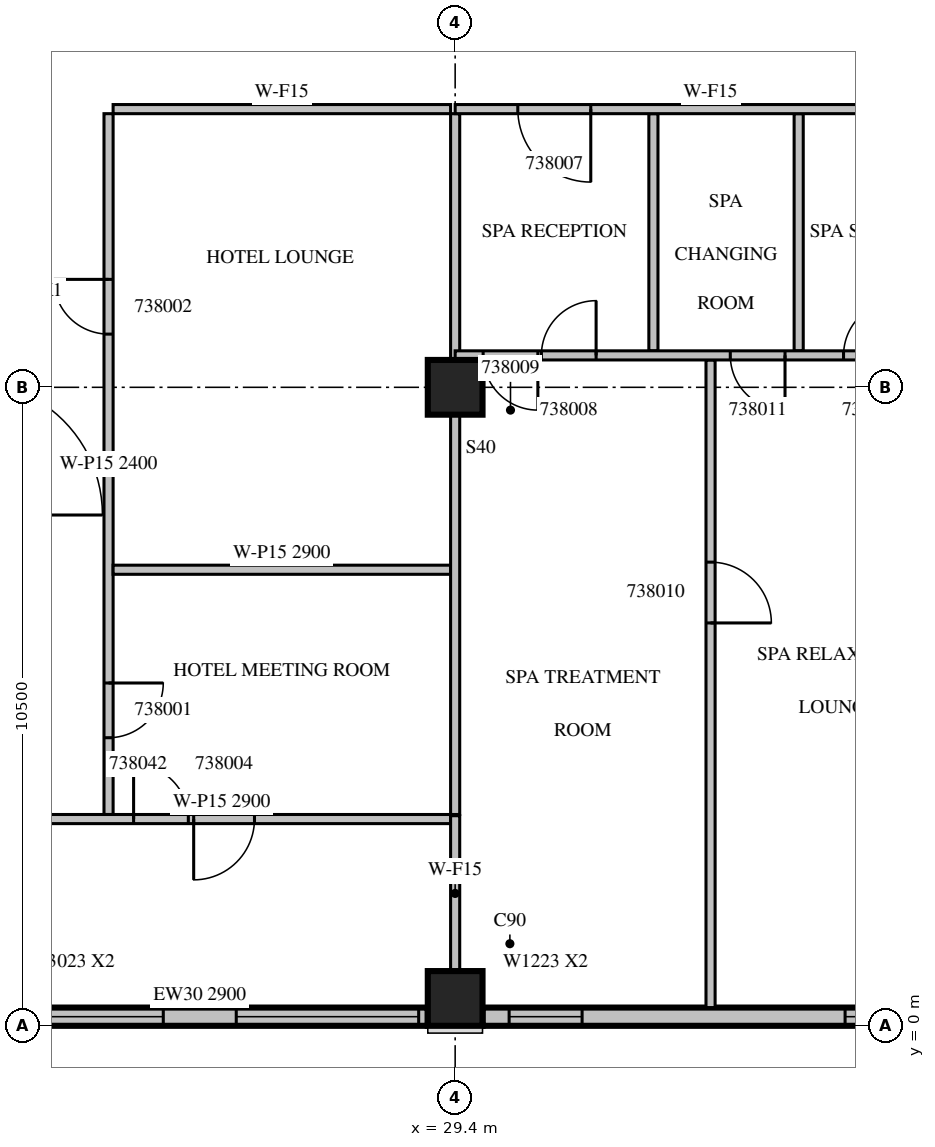
"""IFC4 building model, lengths in metres.
Left out: names, types, materials, properties, quantities, classifications, styles, units other than length and angle.
Written with IfcOpenShell. Run it as: python <this file> out.ifc"""

import sys

from ifc_helpers import new_model, si_unit, direction, frame, frame_2d, origin, origin_2d, place, context, subcontext, project, spatial, rectangle, extrude, source, transform, mapped, element, fill, save


model = new_model("IFC4")
c1 = context("Model", 3, precision=1e-05, world=origin(), true_north=direction((0.0, 1.0)))
c2 = subcontext(c1, "Body", "Model", "MODEL_VIEW")
j1 = project(units=[si_unit("LENGTHUNIT", "METRE"), si_unit("PLANEANGLEUNIT", "RADIAN")], contexts=[c1])
p1 = place(None, origin())
s1 = spatial("IfcSite", under=j1, at=p1, CompositionType="ELEMENT")
p2 = place(p1, origin())
s2 = spatial("IfcBuilding", under=s1, at=p2, CompositionType="ELEMENT")
p3 = place(p2, frame((0.0, 0.0, 177.8)))
s3 = spatial("IfcBuildingStorey", under=s2, at=p3, CompositionType="ELEMENT", Elevation=177.8)
m1 = source(origin(), c2, "Body", "SweptSolid", [
    extrude(rectangle(XDim=0.9, YDim=0.9, at=origin_2d()), origin(), (0.0, 0.0, 1.0), 3.8),
])
for number, where, z_axis, x_axis in (
    (1, (29.4, 0.45, 0.0), (0.0, 0.0, 1.0), (1.0, 0.0, 0.0)),
    (2, (29.4, 10.5, 0.0), (0.0, 0.0, 1.0), (1.0, 0.0, 0.0)),
):
    element("IfcColumn", number, at=place(p3, frame(where, z_axis=z_axis, x_axis=x_axis)), inside=s3, PredefinedType="COLUMN", context=c2, shape_type="MappedRepresentation", body=[
        mapped(m1, transform((0.0, 0.0, 0.0), scale=1.0)),
    ])
p4 = place(p3, frame((21.45, 0.15, 0.0), z_axis=(0.0, 0.0, 1.0), x_axis=(1.0, 0.0, 0.0)))
e3 = element("IfcWall", 3, at=p4, inside=s3, PredefinedType="STANDARD", context=c2, shape_type="SweptSolid", body=[
    extrude(rectangle(XDim=7.5, YDim=0.3, at=frame_2d((3.75, 0.0))), origin(), (0.0, 0.0, 1.0), 2.9),
])
p5 = place(p4, frame((0.15, 0.0, 0.6)))
e4 = element("IfcOpeningElement", 4, at=p5, cuts=e3, PredefinedType="OPENING", context=c2, shape_type="SweptSolid", body=[
    extrude(rectangle(XDim=3.0, YDim=2.3, at=frame_2d((1.5, 1.15))), frame((0.0, 0.16, 0.0), z_axis=(0.0, -1.0, 0.0), x_axis=(1.0, 0.0, 0.0)), (0.0, 0.0, 1.0), 0.32),
])
m2 = source(origin(), c2, "Body", "SweptSolid", [
    extrude(rectangle(XDim=3.0, YDim=2.3, at=frame_2d((1.5, 1.15))), frame((0.0, 0.16, 0.0), z_axis=(0.0, -1.0, 0.0), x_axis=(1.0, 0.0, 0.0)), (0.0, 0.0, 1.0), 0.32),
])
p6 = place(p4, frame((4.35, 0.0, 0.6)))
e5 = element("IfcOpeningElement", 5, at=p6, cuts=e3, PredefinedType="OPENING", context=c2, shape_type="MappedRepresentation", body=[
    mapped(m2, transform((0.0, 0.0, 0.0), scale=1.0)),
])
p7 = place(p3, frame((29.85, 0.15, 0.0), z_axis=(0.0, 0.0, 1.0), x_axis=(1.0, 0.0, 0.0)))
e6 = element("IfcWall", 6, at=p7, inside=s3, PredefinedType="STANDARD", context=c2, shape_type="SweptSolid", body=[
    extrude(rectangle(XDim=7.5, YDim=0.3, at=frame_2d((3.75, 0.0))), origin(), (0.0, 0.0, 1.0), 3.4),
])
p8 = place(p7, frame((0.438, 0.0, 0.6)))
e7 = element("IfcOpeningElement", 7, at=p8, cuts=e6, PredefinedType="OPENING", context=c2, shape_type="SweptSolid", body=[
    extrude(rectangle(XDim=1.2, YDim=2.3, at=frame_2d((0.6, 1.15))), frame((0.0, 0.16, 0.0), z_axis=(0.0, -1.0, 0.0), x_axis=(1.0, 0.0, 0.0)), (0.0, 0.0, 1.0), 0.32),
])
m3 = source(origin(), c2, "Body", "SweptSolid", [
    extrude(rectangle(XDim=1.2, YDim=2.3, at=frame_2d((0.6, 1.15))), frame((0.0, 0.16, 0.0), z_axis=(0.0, -1.0, 0.0), x_axis=(1.0, 0.0, 0.0)), (0.0, 0.0, 1.0), 0.32),
])
p9 = place(p7, frame((5.963, 0.0, 0.6)))
e8 = element("IfcOpeningElement", 8, at=p9, cuts=e6, PredefinedType="OPENING", context=c2, shape_type="MappedRepresentation", body=[
    mapped(m3, transform((0.0, 0.0, 0.0), scale=1.0)),
])
p10 = place(p3, frame((23.7, 15.0, 0.0), z_axis=(0.0, 0.0, 1.0), x_axis=(0.0, -1.0, 0.0)))
e9 = element("IfcWall", 9, at=p10, inside=s3, PredefinedType="PARTITIONING", context=c2, shape_type="SweptSolid", body=[
    extrude(rectangle(XDim=11.525, YDim=0.15, at=frame_2d((5.763, 0.0))), origin(), (0.0, 0.0, 1.0), 2.4),
])
m4 = source(origin(), c2, "Body", "SweptSolid", [
    extrude(rectangle(XDim=0.9, YDim=2.1, at=frame_2d((0.45, 1.05))), frame((0.0, 0.085, 0.0), z_axis=(0.0, -1.0, 0.0), x_axis=(1.0, 0.0, 0.0)), (0.0, 0.0, 1.0), 0.17),
])
p11 = place(p10, frame((9.363, 0.0, 0.0)))
e10 = element("IfcOpeningElement", 10, at=p11, cuts=e9, PredefinedType="OPENING", context=c2, shape_type="MappedRepresentation", body=[
    mapped(m4, transform((0.0, 0.0, 0.0), scale=1.0)),
])
p12 = place(p10, frame((2.725, 0.0, 0.0)))
e11 = element("IfcOpeningElement", 11, at=p12, cuts=e9, PredefinedType="OPENING", context=c2, shape_type="MappedRepresentation", body=[
    mapped(m4, transform((0.0, 0.0, 0.0), scale=1.0)),
])
p13 = place(p3, frame((29.325, 7.5, 0.0), z_axis=(0.0, 0.0, 1.0), x_axis=(-1.0, 0.0, 0.0)))
e12 = element("IfcWall", 12, at=p13, inside=s3, PredefinedType="PARTITIONING", context=c2, shape_type="SweptSolid", body=[
    extrude(rectangle(XDim=5.55, YDim=0.15, at=frame_2d((2.775, 0.0))), origin(), (0.0, 0.0, 1.0), 2.9),
])
p14 = place(p3, frame((29.325, 15.075, 0.0), z_axis=(0.0, 0.0, 1.0), x_axis=(-1.0, 0.0, 0.0)))
e13 = element("IfcWall", 13, at=p14, inside=s3, PredefinedType="PARTITIONING", context=c2, shape_type="SweptSolid", body=[
    extrude(rectangle(XDim=5.55, YDim=0.15, at=frame_2d((2.775, 0.0))), origin(), (0.0, 0.0, 1.0), 3.4),
])
p15 = place(p3, frame((29.4, 3.475, 0.0), z_axis=(0.0, 0.0, 1.0), x_axis=(0.0, 1.0, 0.0)))
e14 = element("IfcWall", 14, at=p15, inside=s3, PredefinedType="PARTITIONING", context=c2, shape_type="SweptSolid", body=[
    extrude(rectangle(XDim=6.576, YDim=0.15, at=frame_2d((3.288, 0.0))), origin(), (0.0, 0.0, 1.0), 3.4),
])
p16 = place(p3, frame((29.4, 10.949, 0.0), z_axis=(0.0, 0.0, 1.0), x_axis=(0.0, 1.0, 0.0)))
e15 = element("IfcWall", 15, at=p16, inside=s3, PredefinedType="PARTITIONING", context=c2, shape_type="SweptSolid", body=[
    extrude(rectangle(XDim=4.051, YDim=0.15, at=frame_2d((2.026, 0.0))), origin(), (0.0, 0.0, 1.0), 3.4),
])
p17 = place(p3, frame((21.8, 3.4, 0.0), z_axis=(0.0, 0.0, 1.0), x_axis=(1.0, 0.0, 0.0)))
e16 = element("IfcWall", 16, at=p17, inside=s3, PredefinedType="PARTITIONING", context=c2, shape_type="SweptSolid", body=[
    extrude(rectangle(XDim=7.525, YDim=0.15, at=frame_2d((3.763, 0.0))), origin(), (0.0, 0.0, 1.0), 2.9),
])
m5 = source(origin(), c2, "Body", "SweptSolid", [
    extrude(rectangle(XDim=1.0, YDim=2.1, at=frame_2d((0.5, 1.05))), frame((0.0, 0.085, 0.0), z_axis=(0.0, -1.0, 0.0), x_axis=(1.0, 0.0, 0.0)), (0.0, 0.0, 1.0), 0.17),
])
p18 = place(p17, frame((3.3, 0.0, 0.0)))
e17 = element("IfcOpeningElement", 17, at=p18, cuts=e16, PredefinedType="OPENING", context=c2, shape_type="MappedRepresentation", body=[
    mapped(m5, transform((0.0, 0.0, 0.0), scale=1.0)),
])
p19 = place(p17, frame((2.312, 0.0, 0.0)))
e18 = element("IfcOpeningElement", 18, at=p19, cuts=e16, PredefinedType="OPENING", context=c2, shape_type="MappedRepresentation", body=[
    mapped(m4, transform((0.0, 0.0, 0.0), scale=1.0)),
])
p20 = place(p3, frame((33.6, 0.3, 0.0), z_axis=(0.0, 0.0, 1.0), x_axis=(0.0, 1.0, 0.0)))
e19 = element("IfcWall", 19, at=p20, inside=s3, PredefinedType="PARTITIONING", context=c2, shape_type="SweptSolid", body=[
    extrude(rectangle(XDim=10.65, YDim=0.15, at=frame_2d((5.325, 0.0))), origin(), (0.0, 0.0, 1.0), 3.4),
])
p21 = place(p20, frame((6.325, 0.0, 0.0)))
e20 = element("IfcOpeningElement", 20, at=p21, cuts=e19, PredefinedType="OPENING", context=c2, shape_type="MappedRepresentation", body=[
    mapped(m5, transform((0.0, 0.0, 0.0), scale=1.0)),
])
p22 = place(p3, frame((32.66, 11.1, 0.0), z_axis=(0.0, 0.0, 1.0), x_axis=(0.0, 1.0, 0.0)))
e21 = element("IfcWall", 21, at=p22, inside=s3, PredefinedType="PARTITIONING", context=c2, shape_type="SweptSolid", body=[
    extrude(rectangle(XDim=3.9, YDim=0.15, at=frame_2d((1.95, 0.0))), origin(), (0.0, 0.0, 1.0), 3.4),
])
m6 = source(origin(), c2, "Body", "SweptSolid", [
    extrude(rectangle(XDim=3.9, YDim=0.15, at=frame_2d((1.95, 0.0))), origin(), (0.0, 0.0, 1.0), 3.4),
])
p23 = place(p3, frame((35.049, 11.1, 0.0), z_axis=(0.0, 0.0, 1.0), x_axis=(0.0, 1.0, 0.0)))
e22 = element("IfcWall", 22, at=p23, inside=s3, PredefinedType="PARTITIONING", context=c2, shape_type="MappedRepresentation", body=[
    mapped(m6, transform((0.0, 0.0, 0.0), scale=1.0)),
])
p24 = place(p3, frame((29.4, 0.899, 0.0), z_axis=(0.0, 0.0, 1.0), x_axis=(0.0, 1.0, 0.0)))
e23 = element("IfcWall", 23, at=p24, inside=s3, PredefinedType="PARTITIONING", context=c2, shape_type="SweptSolid", body=[
    extrude(rectangle(XDim=2.556, YDim=0.15, at=frame_2d((1.278, 0.0))), origin(), (0.0, 0.0, 1.0), 3.4),
])
p25 = place(p3, frame((37.8, 11.025, 0.0), z_axis=(0.0, 0.0, 1.0), x_axis=(-1.0, 0.0, 0.0)))
e24 = element("IfcWall", 24, at=p25, inside=s3, PredefinedType="PARTITIONING", context=c2, shape_type="SweptSolid", body=[
    extrude(rectangle(XDim=8.4, YDim=0.15, at=frame_2d((4.2, 0.0))), origin(), (0.0, 0.0, 1.0), 3.4),
])
p26 = place(p25, frame((6.082, 0.0, 0.0)))
e25 = element("IfcOpeningElement", 25, at=p26, cuts=e24, PredefinedType="OPENING", context=c2, shape_type="MappedRepresentation", body=[
    mapped(m4, transform((0.0, 0.0, 0.0), scale=1.0)),
])
p27 = place(p25, frame((7.04, 0.0, 0.0)))
e26 = element("IfcOpeningElement", 26, at=p27, cuts=e24, PredefinedType="OPENING", context=c2, shape_type="MappedRepresentation", body=[
    mapped(m4, transform((0.0, 0.0, 0.0), scale=1.0)),
])
p28 = place(p25, frame((2.975, 0.0, 0.0)))
e27 = element("IfcOpeningElement", 27, at=p28, cuts=e24, PredefinedType="OPENING", context=c2, shape_type="MappedRepresentation", body=[
    mapped(m4, transform((0.0, 0.0, 0.0), scale=1.0)),
])
p29 = place(p25, frame((1.113, 0.0, 0.0)))
e28 = element("IfcOpeningElement", 28, at=p29, cuts=e24, PredefinedType="OPENING", context=c2, shape_type="MappedRepresentation", body=[
    mapped(m4, transform((0.0, 0.0, 0.0), scale=1.0)),
])
m7 = source(origin(), c2, "Body", "SweptSolid", [
    extrude(rectangle(XDim=8.4, YDim=0.15, at=frame_2d((4.2, 0.0))), origin(), (0.0, 0.0, 1.0), 3.4),
])
p30 = place(p3, frame((37.8, 15.075, 0.0), z_axis=(0.0, 0.0, 1.0), x_axis=(-1.0, 0.0, 0.0)))
e29 = element("IfcWall", 29, at=p30, inside=s3, PredefinedType="PARTITIONING", context=c2, shape_type="MappedRepresentation", body=[
    mapped(m7, transform((0.0, 0.0, 0.0), scale=1.0)),
])
m8 = source(origin(), c2, "Body", "SweptSolid", [
    extrude(rectangle(XDim=1.2, YDim=2.1, at=frame_2d((0.6, 1.05))), frame((0.0, 0.085, 0.0), z_axis=(0.0, -1.0, 0.0), x_axis=(1.0, 0.0, 0.0)), (0.0, 0.0, 1.0), 0.17),
])
p31 = place(p30, frame((6.17, 0.0, 0.0)))
e30 = element("IfcOpeningElement", 30, at=p31, cuts=e29, PredefinedType="OPENING", context=c2, shape_type="MappedRepresentation", body=[
    mapped(m8, transform((0.0, 0.0, 0.0), scale=1.0)),
])
p32 = place(p5, origin())
e31 = element("IfcWindow", 31, at=p32, inside=s3, PartitioningType="SINGLE_PANEL", PredefinedType="WINDOW", context=c2, shape_type="SweptSolid", body=[
    extrude(rectangle(XDim=3.0, YDim=2.3, at=frame_2d((1.5, 1.15))), frame((0.0, 0.03, 0.0), z_axis=(0.0, -1.0, 0.0), x_axis=(1.0, 0.0, 0.0)), (0.0, 0.0, 1.0), 0.06),
])
fill(e4, e31)
m9 = source(origin(), c2, "Body", "SweptSolid", [
    extrude(rectangle(XDim=3.0, YDim=2.3, at=frame_2d((1.5, 1.15))), frame((0.0, 0.03, 0.0), z_axis=(0.0, -1.0, 0.0), x_axis=(1.0, 0.0, 0.0)), (0.0, 0.0, 1.0), 0.06),
])
p33 = place(p6, origin())
e32 = element("IfcWindow", 32, at=p33, inside=s3, PartitioningType="SINGLE_PANEL", PredefinedType="WINDOW", context=c2, shape_type="MappedRepresentation", body=[
    mapped(m9, transform((0.0, 0.0, 0.0), scale=1.0)),
])
fill(e5, e32)
p34 = place(p8, origin())
e33 = element("IfcWindow", 33, at=p34, inside=s3, PartitioningType="SINGLE_PANEL", PredefinedType="WINDOW", context=c2, shape_type="SweptSolid", body=[
    extrude(rectangle(XDim=1.2, YDim=2.3, at=frame_2d((0.6, 1.15))), frame((0.0, 0.03, 0.0), z_axis=(0.0, -1.0, 0.0), x_axis=(1.0, 0.0, 0.0)), (0.0, 0.0, 1.0), 0.06),
])
fill(e7, e33)
m10 = source(origin(), c2, "Body", "SweptSolid", [
    extrude(rectangle(XDim=1.2, YDim=2.3, at=frame_2d((0.6, 1.15))), frame((0.0, 0.03, 0.0), z_axis=(0.0, -1.0, 0.0), x_axis=(1.0, 0.0, 0.0)), (0.0, 0.0, 1.0), 0.06),
])
p35 = place(p9, origin())
e34 = element("IfcWindow", 34, at=p35, inside=s3, PartitioningType="SINGLE_PANEL", PredefinedType="WINDOW", context=c2, shape_type="MappedRepresentation", body=[
    mapped(m10, transform((0.0, 0.0, 0.0), scale=1.0)),
])
fill(e8, e34)
m11 = source(origin(), c2, "Body", "SweptSolid", [
    extrude(rectangle(XDim=0.9, YDim=2.1, at=frame_2d((0.45, 1.05))), frame((0.0, 0.025, 0.0), z_axis=(0.0, -1.0, 0.0), x_axis=(1.0, 0.0, 0.0)), (0.0, 0.0, 1.0), 0.05),
])
p36 = place(p11, origin())
e35 = element("IfcDoor", 35, at=p36, inside=s3, OperationType="SINGLE_SWING_LEFT", PredefinedType="DOOR", context=c2, shape_type="MappedRepresentation", body=[
    mapped(m11, transform((0.0, 0.0, 0.0), scale=1.0)),
])
fill(e10, e35)
p37 = place(p12, origin())
e36 = element("IfcDoor", 36, at=p37, inside=s3, OperationType="SINGLE_SWING_RIGHT", PredefinedType="DOOR", context=c2, shape_type="MappedRepresentation", body=[
    mapped(m11, transform((0.0, 0.0, 0.0), scale=1.0)),
])
fill(e11, e36)
m12 = source(origin(), c2, "Body", "SweptSolid", [
    extrude(rectangle(XDim=1.0, YDim=2.1, at=frame_2d((0.5, 1.05))), frame((0.0, 0.025, 0.0), z_axis=(0.0, -1.0, 0.0), x_axis=(1.0, 0.0, 0.0)), (0.0, 0.0, 1.0), 0.05),
])
p38 = place(p18, origin())
e37 = element("IfcDoor", 37, at=p38, inside=s3, OperationType="SINGLE_SWING_RIGHT", PredefinedType="DOOR", context=c2, shape_type="MappedRepresentation", body=[
    mapped(m12, transform((0.0, 0.0, 0.0), scale=1.0)),
])
fill(e17, e37)
m13 = source(origin(), c2, "Body", "SweptSolid", [
    extrude(rectangle(XDim=1.2, YDim=2.1, at=frame_2d((0.6, 1.05))), frame((0.0, 0.025, 0.0), z_axis=(0.0, -1.0, 0.0), x_axis=(1.0, 0.0, 0.0)), (0.0, 0.0, 1.0), 0.05),
])
p39 = place(p31, origin())
e38 = element("IfcDoor", 38, at=p39, inside=s3, OperationType="SINGLE_SWING_LEFT", PredefinedType="DOOR", context=c2, shape_type="MappedRepresentation", body=[
    mapped(m13, transform((0.0, 0.0, 0.0), scale=1.0)),
])
fill(e30, e38)
p40 = place(p26, origin())
e39 = element("IfcDoor", 39, at=p40, inside=s3, OperationType="SINGLE_SWING_RIGHT", PredefinedType="DOOR", context=c2, shape_type="MappedRepresentation", body=[
    mapped(m11, transform((0.0, 0.0, 0.0), scale=1.0)),
])
fill(e25, e39)
p41 = place(p27, origin())
e40 = element("IfcDoor", 40, at=p41, inside=s3, OperationType="SINGLE_SWING_LEFT", PredefinedType="DOOR", context=c2, shape_type="MappedRepresentation", body=[
    mapped(m11, transform((0.0, 0.0, 0.0), scale=1.0)),
])
fill(e26, e40)
p42 = place(p21, origin())
e41 = element("IfcDoor", 41, at=p42, inside=s3, OperationType="SINGLE_SWING_RIGHT", PredefinedType="DOOR", context=c2, shape_type="MappedRepresentation", body=[
    mapped(m12, transform((0.0, 0.0, 0.0), scale=1.0)),
])
fill(e20, e41)
p43 = place(p28, origin())
e42 = element("IfcDoor", 42, at=p43, inside=s3, OperationType="SINGLE_SWING_LEFT", PredefinedType="DOOR", context=c2, shape_type="MappedRepresentation", body=[
    mapped(m11, transform((0.0, 0.0, 0.0), scale=1.0)),
])
fill(e27, e42)
p44 = place(p29, origin())
e43 = element("IfcDoor", 43, at=p44, inside=s3, OperationType="SINGLE_SWING_RIGHT", PredefinedType="DOOR", context=c2, shape_type="MappedRepresentation", body=[
    mapped(m11, transform((0.0, 0.0, 0.0), scale=1.0)),
])
fill(e28, e43)
p45 = place(p19, origin())
e44 = element("IfcDoor", 44, at=p45, inside=s3, OperationType="SINGLE_SWING_LEFT", PredefinedType="DOOR", context=c2, shape_type="MappedRepresentation", body=[
    mapped(m11, transform((0.0, 0.0, 0.0), scale=1.0)),
])
fill(e18, e44)
save(model, sys.argv[1])
